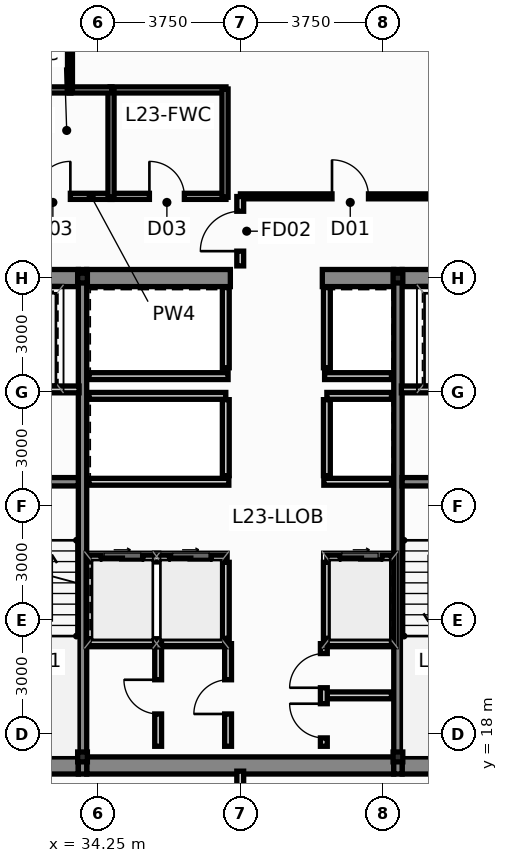
"""IFC4 building model, lengths in metres.
Left out: names, types, materials, properties, quantities, classifications, styles, units other than length and angle.
Written with IfcOpenShell. Run it as: python <this file> out.ifc"""

import sys

from ifc_helpers import new_model, si_unit, direction, frame, frame_2d, origin, origin_2d, place, context, subcontext, project, spatial, rectangle, i_section, extrude, source, transform, mapped, element, fill, save


model = new_model("IFC4")
c1 = context("Model", 3, precision=1e-05, world=origin(), true_north=direction((0.0, 1.0)))
c2 = subcontext(c1, "Body", "Model", "MODEL_VIEW")
j1 = project(units=[si_unit("LENGTHUNIT", "METRE"), si_unit("PLANEANGLEUNIT", "RADIAN")], contexts=[c1])
p1 = place(None, origin())
s1 = spatial("IfcSite", under=j1, at=p1, CompositionType="ELEMENT")
p2 = place(p1, origin())
s2 = spatial("IfcBuilding", under=s1, at=p2, CompositionType="ELEMENT")
p3 = place(p2, frame((0.0, 0.0, 90.8)))
s3 = spatial("IfcBuildingStorey", under=s2, at=p3, CompositionType="ELEMENT", Elevation=90.8)
m1 = source(origin(), c2, "Body", "SweptSolid", [
    extrude(i_section(OverallWidth=0.256, OverallDepth=0.26, WebThickness=0.01, FlangeThickness=0.017, at=origin_2d()), origin(), (0.0, 0.0, 1.0), 3.65),
])
for number, where, z_axis, x_axis in (
    (1, (33.85, 17.4, 0.0), (0.0, 0.0, 1.0), (1.0, 0.0, 0.0)),
    (2, (42.15, 17.4, 0.0), (0.0, 0.0, 1.0), (1.0, 0.0, 0.0)),
    (3, (33.85, 30.0, 0.0), (0.0, 0.0, 1.0), (1.0, 0.0, 0.0)),
    (4, (42.15, 30.0, 0.0), (0.0, 0.0, 1.0), (1.0, 0.0, 0.0)),
):
    element("IfcColumn", number, at=place(p3, frame(where, z_axis=z_axis, x_axis=x_axis)), inside=s3, PredefinedType="COLUMN", context=c2, shape_type="MappedRepresentation", body=[
        mapped(m1, transform((0.0, 0.0, 0.0), scale=1.0)),
    ])
p4 = place(p3, frame((30.84, 17.175, 0.0), z_axis=(0.0, 0.0, 1.0), x_axis=(1.0, 0.0, 0.0)))
e5 = element("IfcWall", 5, at=p4, inside=s3, PredefinedType="SHEAR", context=c2, shape_type="SweptSolid", body=[
    extrude(rectangle(XDim=2.9, YDim=0.45, at=frame_2d((1.45, 0.0))), origin(), (0.0, 0.0, 1.0), 3.65),
])
p5 = place(p3, frame((33.96, 17.175, 0.0), z_axis=(0.0, 0.0, 1.0), x_axis=(1.0, 0.0, 0.0)))
e6 = element("IfcWall", 6, at=p5, inside=s3, PredefinedType="SHEAR", context=c2, shape_type="SweptSolid", body=[
    extrude(rectangle(XDim=8.08, YDim=0.45, at=frame_2d((4.04, 0.0))), origin(), (0.0, 0.0, 1.0), 3.65),
])
for number, where, z_axis, x_axis in (
    (7, (42.26, 17.175, 0.0), (0.0, 0.0, 1.0), (1.0, 0.0, 0.0)),
    (8, (30.84, 30.0, 0.0), (0.0, 0.0, 1.0), (1.0, 0.0, 0.0)),
):
    element("IfcWall", number, at=place(p3, frame(where, z_axis=z_axis, x_axis=x_axis)), inside=s3, PredefinedType="SHEAR", context=c2, shape_type="SweptSolid", body=[
        extrude(rectangle(XDim=2.9, YDim=0.45, at=frame_2d((1.45, 0.0))), origin(), (0.0, 0.0, 1.0), 3.65),
    ])
p6 = place(p3, frame((33.96, 30.0, 0.0), z_axis=(0.0, 0.0, 1.0), x_axis=(1.0, 0.0, 0.0)))
e9 = element("IfcWall", 9, at=p6, inside=s3, PredefinedType="SHEAR", context=c2, shape_type="SweptSolid", body=[
    extrude(rectangle(XDim=3.78, YDim=0.45, at=frame_2d((1.89, 0.0))), origin(), (0.0, 0.0, 1.0), 3.65),
])
p7 = place(p3, frame((40.16, 30.0, 0.0), z_axis=(0.0, 0.0, 1.0), x_axis=(1.0, 0.0, 0.0)))
e10 = element("IfcWall", 10, at=p7, inside=s3, PredefinedType="SHEAR", context=c2, shape_type="SweptSolid", body=[
    extrude(rectangle(XDim=1.88, YDim=0.45, at=frame_2d((0.94, 0.0))), origin(), (0.0, 0.0, 1.0), 3.65),
])
p8 = place(p3, frame((42.26, 30.0, 0.0), z_axis=(0.0, 0.0, 1.0), x_axis=(1.0, 0.0, 0.0)))
e11 = element("IfcWall", 11, at=p8, inside=s3, PredefinedType="SHEAR", context=c2, shape_type="SweptSolid", body=[
    extrude(rectangle(XDim=2.9, YDim=0.45, at=frame_2d((1.45, 0.0))), origin(), (0.0, 0.0, 1.0), 3.65),
])
for number, where, z_axis, x_axis in (
    (12, (33.85, 16.95, 0.0), (0.0, 0.0, 1.0), (0.0, 1.0, 0.0)),
    (13, (42.15, 16.95, 0.0), (0.0, 0.0, 1.0), (0.0, 1.0, 0.0)),
):
    element("IfcWall", number, at=place(p3, frame(where, z_axis=z_axis, x_axis=x_axis)), inside=s3, PredefinedType="SHEAR", context=c2, shape_type="SweptSolid", body=[
        extrude(rectangle(XDim=13.275, YDim=0.22, at=frame_2d((6.638, 0.0))), origin(), (0.0, 0.0, 1.0), 3.65),
    ])
for number, where, z_axis, x_axis in (
    (14, (30.84, 24.64, 0.0), (0.0, 0.0, 1.0), (1.0, 0.0, 0.0)),
    (15, (42.26, 24.64, 0.0), (0.0, 0.0, 1.0), (1.0, 0.0, 0.0)),
):
    element("IfcWall", number, at=place(p3, frame(where, z_axis=z_axis, x_axis=x_axis)), inside=s3, PredefinedType="SHEAR", context=c2, shape_type="SweptSolid", body=[
        extrude(rectangle(XDim=2.9, YDim=0.22, at=frame_2d((1.45, 0.0))), origin(), (0.0, 0.0, 1.0), 3.65),
    ])
p9 = place(p3, frame((34.02, 22.62, 0.0), z_axis=(0.0, 0.0, 1.0), x_axis=(1.0, 0.0, 0.0)))
e16 = element("IfcWall", 16, at=p9, inside=s3, PredefinedType="PARTITIONING", context=c2, shape_type="SweptSolid", body=[
    extrude(rectangle(XDim=3.6, YDim=0.18, at=frame_2d((1.8, 0.0))), origin(), (0.0, 0.0, 1.0), 3.4),
])
p10 = place(p9, frame((0.32, 0.0, 0.0)))
e17 = element("IfcOpeningElement", 17, at=p10, cuts=e16, PredefinedType="OPENING", context=c2, shape_type="SweptSolid", body=[
    extrude(rectangle(XDim=1.1, YDim=2.2, at=frame_2d((0.55, 1.1))), frame((0.0, 0.102, 0.0), z_axis=(0.0, -1.0, 0.0), x_axis=(1.0, 0.0, 0.0)), (0.0, 0.0, 1.0), 0.204),
])
p11 = place(p9, frame((2.12, 0.0, 0.0)))
e18 = element("IfcOpeningElement", 18, at=p11, cuts=e16, PredefinedType="OPENING", context=c2, shape_type="SweptSolid", body=[
    extrude(rectangle(XDim=1.1, YDim=2.2, at=frame_2d((0.55, 1.1))), frame((0.0, 0.102, 0.0), z_axis=(0.0, -1.0, 0.0), x_axis=(1.0, 0.0, 0.0)), (0.0, 0.0, 1.0), 0.204),
])
p12 = place(p3, frame((40.28, 22.62, 0.0), z_axis=(0.0, 0.0, 1.0), x_axis=(1.0, 0.0, 0.0)))
e19 = element("IfcWall", 19, at=p12, inside=s3, PredefinedType="PARTITIONING", context=c2, shape_type="SweptSolid", body=[
    extrude(rectangle(XDim=1.7, YDim=0.18, at=frame_2d((0.85, 0.0))), origin(), (0.0, 0.0, 1.0), 3.4),
])
p13 = place(p12, frame((0.35, 0.0, 0.0)))
e20 = element("IfcOpeningElement", 20, at=p13, cuts=e19, PredefinedType="OPENING", context=c2, shape_type="SweptSolid", body=[
    extrude(rectangle(XDim=1.1, YDim=2.2, at=frame_2d((0.55, 1.1))), frame((0.0, 0.102, 0.0), z_axis=(0.0, -1.0, 0.0), x_axis=(1.0, 0.0, 0.0)), (0.0, 0.0, 1.0), 0.204),
])
for number, where, z_axis, x_axis in (
    (21, (37.62, 20.52, 0.0), (0.0, 0.0, 1.0), (0.0, 1.0, 0.0)),
    (22, (40.28, 20.52, 0.0), (0.0, 0.0, 1.0), (0.0, 1.0, 0.0)),
):
    element("IfcWall", number, at=place(p3, frame(where, z_axis=z_axis, x_axis=x_axis)), inside=s3, PredefinedType="PARTITIONING", context=c2, shape_type="SweptSolid", body=[
        extrude(rectangle(XDim=2.0, YDim=0.18, at=frame_2d((1.0, 0.0))), origin(), (0.0, 0.0, 1.0), 3.4),
    ])
p14 = place(p3, frame((34.02, 26.9, 0.0), z_axis=(0.0, 0.0, 1.0), x_axis=(1.0, 0.0, 0.0)))
e23 = element("IfcWall", 23, at=p14, inside=s3, PredefinedType="PARTITIONING", context=c2, shape_type="SweptSolid", body=[
    extrude(rectangle(XDim=3.6, YDim=0.18, at=frame_2d((1.8, 0.0))), origin(), (0.0, 0.0, 1.0), 3.4),
])
p15 = place(p3, frame((40.28, 26.9, 0.0), z_axis=(0.0, 0.0, 1.0), x_axis=(1.0, 0.0, 0.0)))
e24 = element("IfcWall", 24, at=p15, inside=s3, PredefinedType="PARTITIONING", context=c2, shape_type="SweptSolid", body=[
    extrude(rectangle(XDim=1.7, YDim=0.18, at=frame_2d((0.85, 0.0))), origin(), (0.0, 0.0, 1.0), 3.4),
])
for number, where, z_axis, x_axis in (
    (25, (37.62, 24.8, 0.0), (0.0, 0.0, 1.0), (0.0, 1.0, 0.0)),
    (26, (40.28, 24.8, 0.0), (0.0, 0.0, 1.0), (0.0, 1.0, 0.0)),
):
    element("IfcWall", number, at=place(p3, frame(where, z_axis=z_axis, x_axis=x_axis)), inside=s3, PredefinedType="PARTITIONING", context=c2, shape_type="SweptSolid", body=[
        extrude(rectangle(XDim=2.0, YDim=0.18, at=frame_2d((1.0, 0.0))), origin(), (0.0, 0.0, 1.0), 3.4),
    ])
p16 = place(p3, frame((34.02, 24.64, 0.0), z_axis=(0.0, 0.0, 1.0), x_axis=(1.0, 0.0, 0.0)))
e27 = element("IfcWall", 27, at=p16, inside=s3, PredefinedType="PARTITIONING", context=c2, shape_type="SweptSolid", body=[
    extrude(rectangle(XDim=3.68, YDim=0.18, at=frame_2d((1.84, 0.0))), origin(), (0.0, 0.0, 1.0), 3.4),
])
p17 = place(p3, frame((40.2, 24.64, 0.0), z_axis=(0.0, 0.0, 1.0), x_axis=(1.0, 0.0, 0.0)))
e28 = element("IfcWall", 28, at=p17, inside=s3, PredefinedType="PARTITIONING", context=c2, shape_type="SweptSolid", body=[
    extrude(rectangle(XDim=1.78, YDim=0.18, at=frame_2d((0.89, 0.0))), origin(), (0.0, 0.0, 1.0), 3.4),
])
p18 = place(p3, frame((34.02, 27.42, 0.0), z_axis=(0.0, 0.0, 1.0), x_axis=(1.0, 0.0, 0.0)))
e29 = element("IfcWall", 29, at=p18, inside=s3, PredefinedType="PARTITIONING", context=c2, shape_type="SweptSolid", body=[
    extrude(rectangle(XDim=3.66, YDim=0.18, at=frame_2d((1.83, 0.0))), origin(), (0.0, 0.0, 1.0), 3.4),
])
p19 = place(p3, frame((40.22, 27.42, 0.0), z_axis=(0.0, 0.0, 1.0), x_axis=(1.0, 0.0, 0.0)))
e30 = element("IfcWall", 30, at=p19, inside=s3, PredefinedType="PARTITIONING", context=c2, shape_type="SweptSolid", body=[
    extrude(rectangle(XDim=1.76, YDim=0.18, at=frame_2d((0.88, 0.0))), origin(), (0.0, 0.0, 1.0), 3.4),
])
for number, where, z_axis, x_axis in (
    (31, (37.62, 27.64, 0.0), (0.0, 0.0, 1.0), (0.0, 1.0, 0.0)),
    (32, (40.28, 27.64, 0.0), (0.0, 0.0, 1.0), (0.0, 1.0, 0.0)),
):
    element("IfcWall", number, at=place(p3, frame(where, z_axis=z_axis, x_axis=x_axis)), inside=s3, PredefinedType="PARTITIONING", context=c2, shape_type="SweptSolid", body=[
        extrude(rectangle(XDim=2.11, YDim=0.18, at=frame_2d((1.055, 0.0))), origin(), (0.0, 0.0, 1.0), 3.4),
    ])
for number, where, z_axis, x_axis in (
    (33, (30.86, 27.07, 0.0), (0.0, 0.0, 1.0), (1.0, 0.0, 0.0)),
    (34, (42.24, 27.07, 0.0), (0.0, 0.0, 1.0), (1.0, 0.0, 0.0)),
):
    element("IfcWall", number, at=place(p3, frame(where, z_axis=z_axis, x_axis=x_axis)), inside=s3, PredefinedType="PARTITIONING", context=c2, shape_type="SweptSolid", body=[
        extrude(rectangle(XDim=2.9, YDim=0.18, at=frame_2d((1.45, 0.0))), origin(), (0.0, 0.0, 1.0), 3.4),
    ])
p20 = place(p3, frame((34.02, 20.42, 0.0), z_axis=(0.0, 0.0, 1.0), x_axis=(1.0, 0.0, 0.0)))
e35 = element("IfcWall", 35, at=p20, inside=s3, PredefinedType="PARTITIONING", context=c2, shape_type="SweptSolid", body=[
    extrude(rectangle(XDim=3.64, YDim=0.18, at=frame_2d((1.82, 0.0))), origin(), (0.0, 0.0, 1.0), 3.4),
])
p21 = place(p3, frame((40.22, 20.42, 0.0), z_axis=(0.0, 0.0, 1.0), x_axis=(1.0, 0.0, 0.0)))
e36 = element("IfcWall", 36, at=p21, inside=s3, PredefinedType="PARTITIONING", context=c2, shape_type="SweptSolid", body=[
    extrude(rectangle(XDim=1.76, YDim=0.18, at=frame_2d((0.88, 0.0))), origin(), (0.0, 0.0, 1.0), 3.4),
])
p22 = place(p3, frame((35.84, 17.68, 0.0), z_axis=(0.0, 0.0, 1.0), x_axis=(0.0, 1.0, 0.0)))
e37 = element("IfcWall", 37, at=p22, inside=s3, PredefinedType="PARTITIONING", context=c2, shape_type="SweptSolid", body=[
    extrude(rectangle(XDim=2.7, YDim=0.18, at=frame_2d((1.35, 0.0))), origin(), (0.0, 0.0, 1.0), 3.4),
])
p23 = place(p22, frame((0.85, 0.0, 0.0)))
e38 = element("IfcOpeningElement", 38, at=p23, cuts=e37, PredefinedType="OPENING", context=c2, shape_type="SweptSolid", body=[
    extrude(rectangle(XDim=0.9, YDim=2.1, at=frame_2d((0.45, 1.05))), frame((0.0, 0.102, 0.0), z_axis=(0.0, -1.0, 0.0), x_axis=(1.0, 0.0, 0.0)), (0.0, 0.0, 1.0), 0.204),
])
p24 = place(p3, frame((37.68, 17.68, 0.0), z_axis=(0.0, 0.0, 1.0), x_axis=(0.0, 1.0, 0.0)))
e39 = element("IfcWall", 39, at=p24, inside=s3, PredefinedType="PARTITIONING", context=c2, shape_type="SweptSolid", body=[
    extrude(rectangle(XDim=2.7, YDim=0.18, at=frame_2d((1.35, 0.0))), origin(), (0.0, 0.0, 1.0), 3.4),
])
p25 = place(p24, frame((0.85, 0.0, 0.0)))
e40 = element("IfcOpeningElement", 40, at=p25, cuts=e39, PredefinedType="OPENING", context=c2, shape_type="SweptSolid", body=[
    extrude(rectangle(XDim=0.9, YDim=2.1, at=frame_2d((0.45, 1.05))), frame((0.0, 0.102, 0.0), z_axis=(0.0, -1.0, 0.0), x_axis=(1.0, 0.0, 0.0)), (0.0, 0.0, 1.0), 0.204),
])
p26 = place(p3, frame((40.28, 19.02, 0.0), z_axis=(0.0, 0.0, 1.0), x_axis=(1.0, 0.0, 0.0)))
e41 = element("IfcWall", 41, at=p26, inside=s3, PredefinedType="PARTITIONING", context=c2, shape_type="SweptSolid", body=[
    extrude(rectangle(XDim=1.7, YDim=0.18, at=frame_2d((0.85, 0.0))), origin(), (0.0, 0.0, 1.0), 3.4),
])
p27 = place(p3, frame((40.2, 17.68, 0.0), z_axis=(0.0, 0.0, 1.0), x_axis=(0.0, 1.0, 0.0)))
e42 = element("IfcWall", 42, at=p27, inside=s3, PredefinedType="PARTITIONING", context=c2, shape_type="SweptSolid", body=[
    extrude(rectangle(XDim=2.7, YDim=0.18, at=frame_2d((1.35, 0.0))), origin(), (0.0, 0.0, 1.0), 3.4),
])
p28 = place(p27, frame((0.22, 0.0, 0.0)))
e43 = element("IfcOpeningElement", 43, at=p28, cuts=e42, PredefinedType="OPENING", context=c2, shape_type="SweptSolid", body=[
    extrude(rectangle(XDim=0.9, YDim=2.1, at=frame_2d((0.45, 1.05))), frame((0.0, 0.102, 0.0), z_axis=(0.0, -1.0, 0.0), x_axis=(1.0, 0.0, 0.0)), (0.0, 0.0, 1.0), 0.204),
])
p29 = place(p27, frame((1.54, 0.0, 0.0)))
e44 = element("IfcOpeningElement", 44, at=p29, cuts=e42, PredefinedType="OPENING", context=c2, shape_type="SweptSolid", body=[
    extrude(rectangle(XDim=0.9, YDim=2.1, at=frame_2d((0.45, 1.05))), frame((0.0, 0.102, 0.0), z_axis=(0.0, -1.0, 0.0), x_axis=(1.0, 0.0, 0.0)), (0.0, 0.0, 1.0), 0.204),
])
p30 = place(p3, frame((31.575, 32.15, 0.0), z_axis=(0.0, 0.0, 1.0), x_axis=(1.0, 0.0, 0.0)))
e45 = element("IfcWall", 45, at=p30, inside=s3, PredefinedType="PLUMBINGWALL", context=c2, shape_type="SweptSolid", body=[
    extrude(rectangle(XDim=3.05, YDim=0.16, at=frame_2d((1.525, 0.0))), origin(), (0.0, 0.0, 1.0), 3.026),
])
p31 = place(p30, frame((1.035, 0.0, 0.0)))
e46 = element("IfcOpeningElement", 46, at=p31, cuts=e45, PredefinedType="OPENING", context=c2, shape_type="SweptSolid", body=[
    extrude(rectangle(XDim=0.92, YDim=2.1, at=frame_2d((0.46, 1.05))), frame((0.0, 0.092, 0.0), z_axis=(0.0, -1.0, 0.0), x_axis=(1.0, 0.0, 0.0)), (0.0, 0.0, 1.0), 0.184),
])
p32 = place(p3, frame((34.575, 32.15, 0.0), z_axis=(0.0, 0.0, 1.0), x_axis=(1.0, 0.0, 0.0)))
e47 = element("IfcWall", 47, at=p32, inside=s3, PredefinedType="PLUMBINGWALL", context=c2, shape_type="SweptSolid", body=[
    extrude(rectangle(XDim=3.05, YDim=0.16, at=frame_2d((1.525, 0.0))), origin(), (0.0, 0.0, 1.0), 3.026),
])
p33 = place(p32, frame((1.035, 0.0, 0.0)))
e48 = element("IfcOpeningElement", 48, at=p33, cuts=e47, PredefinedType="OPENING", context=c2, shape_type="SweptSolid", body=[
    extrude(rectangle(XDim=0.92, YDim=2.1, at=frame_2d((0.46, 1.05))), frame((0.0, 0.092, 0.0), z_axis=(0.0, -1.0, 0.0), x_axis=(1.0, 0.0, 0.0)), (0.0, 0.0, 1.0), 0.184),
])
p34 = place(p3, frame((37.625, 34.95, 0.0), z_axis=(0.0, 0.0, 1.0), x_axis=(-1.0, 0.0, 0.0)))
e49 = element("IfcWall", 49, at=p34, inside=s3, PredefinedType="PLUMBINGWALL", context=c2, shape_type="SweptSolid", body=[
    extrude(rectangle(XDim=3.05, YDim=0.16, at=frame_2d((1.525, 0.0))), origin(), (0.0, 0.0, 1.0), 3.026),
])
for number, where, z_axis, x_axis in (
    (50, (34.6, 32.125, 0.0), (0.0, 0.0, 1.0), (0.0, 1.0, 0.0)),
    (51, (37.6, 32.125, 0.0), (0.0, 0.0, 1.0), (0.0, 1.0, 0.0)),
):
    element("IfcWall", number, at=place(p3, frame(where, z_axis=z_axis, x_axis=x_axis)), inside=s3, PredefinedType="PLUMBINGWALL", context=c2, shape_type="SweptSolid", body=[
        extrude(rectangle(XDim=2.85, YDim=0.16, at=frame_2d((1.425, 0.0))), origin(), (0.0, 0.0, 1.0), 3.4),
    ])
p35 = place(p3, frame((31.575, 34.95, 0.0), z_axis=(0.0, 0.0, 1.0), x_axis=(1.0, 0.0, 0.0)))
e52 = element("IfcWall", 52, at=p35, inside=s3, PredefinedType="PLUMBINGWALL", context=c2, shape_type="SweptSolid", body=[
    extrude(rectangle(XDim=1.97, YDim=0.16, at=frame_2d((0.985, 0.0))), origin(), (0.0, 0.0, 1.0), 3.026),
])
p36 = place(p3, frame((33.495, 34.95, 0.0), z_axis=(0.0, 0.0, 1.0), x_axis=(1.0, 0.0, 0.0)))
e53 = element("IfcWall", 53, at=p36, inside=s3, PredefinedType="PLUMBINGWALL", context=c2, shape_type="SweptSolid", body=[
    extrude(rectangle(XDim=1.13, YDim=0.16, at=frame_2d((0.565, 0.0))), origin(), (0.0, 0.0, 1.0), 3.026),
])
p37 = place(p3, frame((33.52, 34.955, 0.0), z_axis=(0.0, 0.0, 1.0), x_axis=(0.0, 1.0, 0.0)))
e54 = element("IfcWall", 54, at=p37, inside=s3, PredefinedType="PARTITIONING", context=c2, shape_type="SweptSolid", body=[
    extrude(rectangle(XDim=16.007, YDim=0.13, at=frame_2d((8.003, 0.0))), origin(), (0.0, 0.0, 1.0), 3.4),
])
p38 = place(p3, frame((38.005, 32.15, 0.0), z_axis=(0.0, 0.0, 1.0), x_axis=(1.0, 0.0, 0.0)))
e55 = element("IfcWall", 55, at=p38, inside=s3, PredefinedType="PARTITIONING", context=c2, shape_type="SweptSolid", body=[
    extrude(rectangle(XDim=5.78, YDim=0.13, at=frame_2d((2.89, 0.0))), origin(), (0.0, 0.0, 1.0), 3.026),
])
p39 = place(p38, frame((2.41, 0.0, 0.0)))
e56 = element("IfcOpeningElement", 56, at=p39, cuts=e55, PredefinedType="OPENING", context=c2, shape_type="SweptSolid", body=[
    extrude(rectangle(XDim=0.96, YDim=2.15, at=frame_2d((0.48, 1.075))), frame((0.0, 0.077, 0.0), z_axis=(0.0, -1.0, 0.0), x_axis=(1.0, 0.0, 0.0)), (0.0, 0.0, 1.0), 0.154),
])
p40 = place(p3, frame((38.0, 15.205, 0.0), z_axis=(0.0, 0.0, 1.0), x_axis=(0.0, 1.0, 0.0)))
e57 = element("IfcWall", 57, at=p40, inside=s3, PredefinedType="PARTITIONING", context=c2, shape_type="SweptSolid", body=[
    extrude(rectangle(XDim=1.82, YDim=0.18, at=frame_2d((0.91, 0.0))), origin(), (0.0, 0.0, 1.0), 3.4),
])
p41 = place(p40, frame((0.385, 0.0, 0.0)))
e58 = element("IfcOpeningElement", 58, at=p41, cuts=e57, PredefinedType="OPENING", context=c2, shape_type="SweptSolid", body=[
    extrude(rectangle(XDim=1.05, YDim=2.15, at=frame_2d((0.525, 1.075))), frame((0.0, 0.102, 0.0), z_axis=(0.0, -1.0, 0.0), x_axis=(1.0, 0.0, 0.0)), (0.0, 0.0, 1.0), 0.204),
])
p42 = place(p3, frame((38.0, 30.32, 0.0), z_axis=(0.0, 0.0, 1.0), x_axis=(0.0, 1.0, 0.0)))
e59 = element("IfcWall", 59, at=p42, inside=s3, PredefinedType="PARTITIONING", context=c2, shape_type="SweptSolid", body=[
    extrude(rectangle(XDim=1.825, YDim=0.18, at=frame_2d((0.913, 0.0))), origin(), (0.0, 0.0, 1.0), 3.4),
])
p43 = place(p42, frame((0.388, 0.0, 0.0)))
e60 = element("IfcOpeningElement", 60, at=p43, cuts=e59, PredefinedType="OPENING", context=c2, shape_type="SweptSolid", body=[
    extrude(rectangle(XDim=1.05, YDim=2.15, at=frame_2d((0.525, 1.075))), frame((0.0, 0.102, 0.0), z_axis=(0.0, -1.0, 0.0), x_axis=(1.0, 0.0, 0.0)), (0.0, 0.0, 1.0), 0.204),
])
p44 = place(p10, origin())
e61 = element("IfcDoor", 61, at=p44, inside=s3, OperationType="SLIDING_TO_LEFT", PredefinedType="DOOR", context=c2, shape_type="SweptSolid", body=[
    extrude(rectangle(XDim=1.1, YDim=2.2, at=frame_2d((0.55, 1.1))), frame((0.0, 0.025, 0.0), z_axis=(0.0, -1.0, 0.0), x_axis=(1.0, 0.0, 0.0)), (0.0, 0.0, 1.0), 0.05),
])
fill(e17, e61)
p45 = place(p11, origin())
e62 = element("IfcDoor", 62, at=p45, inside=s3, OperationType="SLIDING_TO_RIGHT", PredefinedType="DOOR", context=c2, shape_type="SweptSolid", body=[
    extrude(rectangle(XDim=1.1, YDim=2.2, at=frame_2d((0.55, 1.1))), frame((0.0, 0.025, 0.0), z_axis=(0.0, -1.0, 0.0), x_axis=(1.0, 0.0, 0.0)), (0.0, 0.0, 1.0), 0.05),
])
fill(e18, e62)
p46 = place(p13, origin())
e63 = element("IfcDoor", 63, at=p46, inside=s3, OperationType="SLIDING_TO_LEFT", PredefinedType="DOOR", context=c2, shape_type="SweptSolid", body=[
    extrude(rectangle(XDim=1.1, YDim=2.2, at=frame_2d((0.55, 1.1))), frame((0.0, 0.025, 0.0), z_axis=(0.0, -1.0, 0.0), x_axis=(1.0, 0.0, 0.0)), (0.0, 0.0, 1.0), 0.05),
])
fill(e20, e63)
p47 = place(p23, origin())
e64 = element("IfcDoor", 64, at=p47, inside=s3, OperationType="SINGLE_SWING_RIGHT", PredefinedType="DOOR", context=c2, shape_type="SweptSolid", body=[
    extrude(rectangle(XDim=0.9, YDim=2.1, at=frame_2d((0.45, 1.05))), frame((0.0, 0.025, 0.0), z_axis=(0.0, -1.0, 0.0), x_axis=(1.0, 0.0, 0.0)), (0.0, 0.0, 1.0), 0.05),
])
fill(e38, e64)
p48 = place(p25, origin())
e65 = element("IfcDoor", 65, at=p48, inside=s3, OperationType="SINGLE_SWING_LEFT", PredefinedType="DOOR", context=c2, shape_type="SweptSolid", body=[
    extrude(rectangle(XDim=0.9, YDim=2.1, at=frame_2d((0.45, 1.05))), frame((0.0, 0.025, 0.0), z_axis=(0.0, -1.0, 0.0), x_axis=(1.0, 0.0, 0.0)), (0.0, 0.0, 1.0), 0.05),
])
fill(e40, e65)
p49 = place(p28, origin())
e66 = element("IfcDoor", 66, at=p49, inside=s3, OperationType="SINGLE_SWING_RIGHT", PredefinedType="DOOR", context=c2, shape_type="SweptSolid", body=[
    extrude(rectangle(XDim=0.9, YDim=2.1, at=frame_2d((0.45, 1.05))), frame((0.0, 0.025, 0.0), z_axis=(0.0, -1.0, 0.0), x_axis=(1.0, 0.0, 0.0)), (0.0, 0.0, 1.0), 0.05),
])
fill(e43, e66)
p50 = place(p29, origin())
e67 = element("IfcDoor", 67, at=p50, inside=s3, OperationType="SINGLE_SWING_LEFT", PredefinedType="DOOR", context=c2, shape_type="SweptSolid", body=[
    extrude(rectangle(XDim=0.9, YDim=2.1, at=frame_2d((0.45, 1.05))), frame((0.0, 0.025, 0.0), z_axis=(0.0, -1.0, 0.0), x_axis=(1.0, 0.0, 0.0)), (0.0, 0.0, 1.0), 0.05),
])
fill(e44, e67)
p51 = place(p31, origin())
e68 = element("IfcDoor", 68, at=p51, inside=s3, OperationType="SINGLE_SWING_RIGHT", PredefinedType="DOOR", context=c2, shape_type="SweptSolid", body=[
    extrude(rectangle(XDim=0.92, YDim=2.1, at=frame_2d((0.46, 1.05))), frame((0.0, 0.025, 0.0), z_axis=(0.0, -1.0, 0.0), x_axis=(1.0, 0.0, 0.0)), (0.0, 0.0, 1.0), 0.05),
])
fill(e46, e68)
p52 = place(p33, origin())
e69 = element("IfcDoor", 69, at=p52, inside=s3, OperationType="SINGLE_SWING_LEFT", PredefinedType="DOOR", context=c2, shape_type="SweptSolid", body=[
    extrude(rectangle(XDim=0.92, YDim=2.1, at=frame_2d((0.46, 1.05))), frame((0.0, 0.025, 0.0), z_axis=(0.0, -1.0, 0.0), x_axis=(1.0, 0.0, 0.0)), (0.0, 0.0, 1.0), 0.05),
])
fill(e48, e69)
p53 = place(p39, origin())
e70 = element("IfcDoor", 70, at=p53, inside=s3, OperationType="SINGLE_SWING_LEFT", PredefinedType="DOOR", context=c2, shape_type="SweptSolid", body=[
    extrude(rectangle(XDim=0.96, YDim=2.15, at=frame_2d((0.48, 1.075))), frame((0.0, 0.025, 0.0), z_axis=(0.0, -1.0, 0.0), x_axis=(1.0, 0.0, 0.0)), (0.0, 0.0, 1.0), 0.05),
])
fill(e56, e70)
p54 = place(p43, origin())
e71 = element("IfcDoor", 71, at=p54, inside=s3, OperationType="SINGLE_SWING_LEFT", PredefinedType="DOOR", context=c2, shape_type="SweptSolid", body=[
    extrude(rectangle(XDim=1.05, YDim=2.15, at=frame_2d((0.525, 1.075))), frame((0.0, 0.025, 0.0), z_axis=(0.0, -1.0, 0.0), x_axis=(1.0, 0.0, 0.0)), (0.0, 0.0, 1.0), 0.05),
])
fill(e60, e71)
save(model, sys.argv[1])
